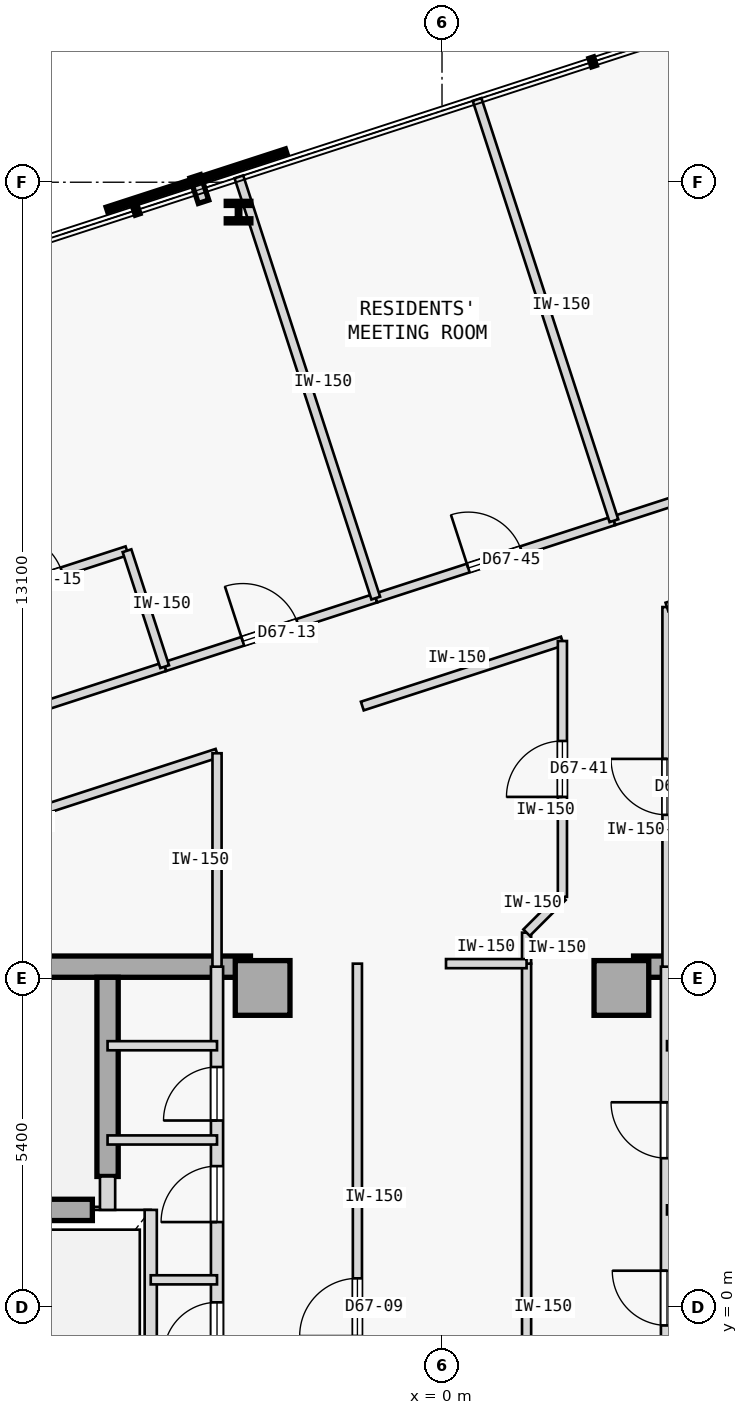
"""IFC4 building model, lengths in metres.
Left out: names, types, materials, properties, quantities, classifications, styles, units other than length and angle.
Written with IfcOpenShell. Run it as: python <this file> out.ifc"""

import sys

from ifc_helpers import new_model, si_unit, direction, frame, frame_2d, origin, origin_2d, place, context, subcontext, project, spatial, rectangle, i_section, extrude, element, fill, save


model = new_model("IFC4")
c1 = context("Model", 3, precision=1e-05, world=origin(), true_north=direction((0.0, 1.0)))
c2 = subcontext(c1, "Body", "Model", "MODEL_VIEW")
j1 = project(units=[si_unit("LENGTHUNIT", "METRE"), si_unit("PLANEANGLEUNIT", "RADIAN")], contexts=[c1])
p1 = place(None, origin())
s1 = spatial("IfcSite", under=j1, at=p1, CompositionType="ELEMENT")
p2 = place(p1, origin())
s2 = spatial("IfcBuilding", under=s1, at=p2, CompositionType="ELEMENT")
p3 = place(p2, frame((0.0, 0.0, 251.1)))
s3 = spatial("IfcBuildingStorey", under=s2, at=p3, CompositionType="ELEMENT", Elevation=251.1)
for number, where, z_axis, x_axis in (
    (1, (-2.95, 5.25, 0.0), (0.0, 0.0, 1.0), (1.0, 0.0, 0.0)),
    (2, (2.95, 5.25, 0.0), (0.0, 0.0, 1.0), (1.0, 0.0, 0.0)),
):
    element("IfcColumn", number, at=place(p3, frame(where, z_axis=z_axis, x_axis=x_axis)), inside=s3, PredefinedType="COLUMN", context=c2, shape_type="SweptSolid", body=[
        extrude(rectangle(XDim=0.9, YDim=0.9, at=origin_2d()), origin(), (0.0, 0.0, 1.0), 3.35),
    ])
p4 = place(p3, frame((-14.56, 5.6, 0.0), z_axis=(0.0, 0.0, 1.0), x_axis=(1.0, 0.0, 0.0)))
e3 = element("IfcWall", 3, at=p4, inside=s3, PredefinedType="SHEAR", context=c2, shape_type="SweptSolid", body=[
    extrude(rectangle(XDim=11.41, YDim=0.35, at=frame_2d((5.705, 0.0))), origin(), (0.0, 0.0, 1.0), 2.95),
])
p5 = place(p3, frame((-5.5, 2.15, 0.0), z_axis=(0.0, 0.0, 1.0), x_axis=(0.0, 1.0, 0.0)))
e4 = element("IfcWall", 4, at=p5, inside=s3, PredefinedType="SHEAR", context=c2, shape_type="SweptSolid", body=[
    extrude(rectangle(XDim=3.275, YDim=0.35, at=frame_2d((1.638, 0.0))), origin(), (0.0, 0.0, 1.0), 2.95),
])
p6 = place(p3, frame((-10.9, 1.6, 0.0), z_axis=(0.0, 0.0, 1.0), x_axis=(1.0, 0.0, 0.0)))
e5 = element("IfcWall", 5, at=p6, inside=s3, PredefinedType="SHEAR", context=c2, shape_type="SweptSolid", body=[
    extrude(rectangle(XDim=5.15, YDim=0.35, at=frame_2d((2.575, 0.0))), origin(), (0.0, 0.0, 1.0), 2.95),
])
p7 = place(p3, frame((3.15, 5.6, 0.0), z_axis=(0.0, 0.0, 1.0), x_axis=(1.0, 0.0, 0.0)))
e6 = element("IfcWall", 6, at=p7, inside=s3, PredefinedType="SHEAR", context=c2, shape_type="SweptSolid", body=[
    extrude(rectangle(XDim=11.41, YDim=0.35, at=frame_2d((5.705, 0.0))), origin(), (0.0, 0.0, 1.0), 2.95),
])
p8 = place(p3, frame((-3.346, 18.009, 0.0), z_axis=(0.0, 0.0, 1.0), x_axis=(1.0, 0.0, 0.0)))
e7 = element("IfcColumn", 7, at=p8, inside=s3, PredefinedType="COLUMN", context=c2, shape_type="SweptSolid", body=[
    extrude(i_section(OverallWidth=0.405, OverallDepth=0.355, WebThickness=0.042, FlangeThickness=0.068, FilletRadius=0.015, at=origin_2d()), origin(), (0.0, 0.0, 1.0), 3.35),
])
p9 = place(p3, frame((-5.5, 1.6, 0.0), z_axis=(0.0, 0.0, 1.0), x_axis=(0.0, 1.0, 0.0)))
e8 = element("IfcWall", 8, at=p9, inside=s3, PredefinedType="STANDARD", context=c2, shape_type="SweptSolid", body=[
    extrude(rectangle(XDim=0.55, YDim=0.25, at=frame_2d((0.275, 0.0))), origin(), (0.0, 0.0, 1.0), 2.95),
])
p10 = place(p3, frame((-3.7, -1.15, 0.0), z_axis=(0.0, 0.0, 1.0), x_axis=(0.0, 1.0, 0.0)))
e9 = element("IfcWall", 9, at=p10, inside=s3, PredefinedType="STANDARD", context=c2, shape_type="SweptSolid", body=[
    extrude(rectangle(XDim=6.75, YDim=0.2, at=frame_2d((3.375, 0.0))), origin(), (0.0, 0.0, 1.0), 2.95),
])
p11 = place(p10, frame((0.35, 0.0, 0.0)))
e10 = element("IfcOpeningElement", 10, at=p11, cuts=e9, PredefinedType="OPENING", context=c2, shape_type="SweptSolid", body=[
    extrude(rectangle(XDim=0.88, YDim=2.15, at=frame_2d((0.44, 1.075))), frame((0.0, 0.11, 0.0), z_axis=(0.0, -1.0, 0.0), x_axis=(1.0, 0.0, 0.0)), (0.0, 0.0, 1.0), 0.22),
])
p12 = place(p10, frame((2.55, 0.0, 0.0)))
e11 = element("IfcOpeningElement", 11, at=p12, cuts=e9, PredefinedType="OPENING", context=c2, shape_type="SweptSolid", body=[
    extrude(rectangle(XDim=0.92, YDim=2.15, at=frame_2d((0.46, 1.075))), frame((0.0, 0.11, 0.0), z_axis=(0.0, -1.0, 0.0), x_axis=(1.0, 0.0, 0.0)), (0.0, 0.0, 1.0), 0.22),
])
p13 = place(p10, frame((4.22, 0.0, 0.0)))
e12 = element("IfcOpeningElement", 12, at=p13, cuts=e9, PredefinedType="OPENING", context=c2, shape_type="SweptSolid", body=[
    extrude(rectangle(XDim=0.88, YDim=2.15, at=frame_2d((0.44, 1.075))), frame((0.0, 0.11, 0.0), z_axis=(0.0, -1.0, 0.0), x_axis=(1.0, 0.0, 0.0)), (0.0, 0.0, 1.0), 0.22),
])
p14 = place(p3, frame((-4.79, -1.15, 0.0), z_axis=(0.0, 0.0, 1.0), x_axis=(0.0, 1.0, 0.0)))
e13 = element("IfcWall", 13, at=p14, inside=s3, PredefinedType="STANDARD", context=c2, shape_type="SweptSolid", body=[
    extrude(rectangle(XDim=2.75, YDim=0.2, at=frame_2d((1.375, 0.0))), origin(), (0.0, 0.0, 1.0), 2.95),
])
p15 = place(p3, frame((3.7, -1.15, 0.0), z_axis=(0.0, 0.0, 1.0), x_axis=(0.0, 1.0, 0.0)))
e14 = element("IfcWall", 14, at=p15, inside=s3, PredefinedType="STANDARD", context=c2, shape_type="SweptSolid", body=[
    extrude(rectangle(XDim=6.75, YDim=0.2, at=frame_2d((3.375, 0.0))), origin(), (0.0, 0.0, 1.0), 2.95),
])
p16 = place(p15, frame((3.6, 0.0, 0.0)))
e15 = element("IfcOpeningElement", 15, at=p16, cuts=e14, PredefinedType="OPENING", context=c2, shape_type="SweptSolid", body=[
    extrude(rectangle(XDim=0.92, YDim=2.15, at=frame_2d((0.46, 1.075))), frame((0.0, 0.11, 0.0), z_axis=(0.0, -1.0, 0.0), x_axis=(1.0, 0.0, 0.0)), (0.0, 0.0, 1.0), 0.22),
])
p17 = place(p15, frame((0.85, 0.0, 0.0)))
e16 = element("IfcOpeningElement", 16, at=p17, cuts=e14, PredefinedType="OPENING", context=c2, shape_type="SweptSolid", body=[
    extrude(rectangle(XDim=0.9, YDim=2.15, at=frame_2d((0.45, 1.075))), frame((0.0, 0.11, 0.0), z_axis=(0.0, -1.0, 0.0), x_axis=(1.0, 0.0, 0.0)), (0.0, 0.0, 1.0), 0.22),
])
p18 = place(p3, frame((-5.5, 4.3, 0.0), z_axis=(0.0, 0.0, 1.0), x_axis=(1.0, 0.0, 0.0)))
e17 = element("IfcWall", 17, at=p18, inside=s3, PredefinedType="PARTITIONING", context=c2, shape_type="SweptSolid", body=[
    extrude(rectangle(XDim=1.8, YDim=0.15, at=frame_2d((0.9, 0.0))), origin(), (0.0, 0.0, 1.0), 2.95),
])
p19 = place(p3, frame((-4.79, 0.45, 0.0), z_axis=(0.0, 0.0, 1.0), x_axis=(1.0, 0.0, 0.0)))
e18 = element("IfcWall", 18, at=p19, inside=s3, PredefinedType="PARTITIONING", context=c2, shape_type="SweptSolid", body=[
    extrude(rectangle(XDim=1.09, YDim=0.15, at=frame_2d((0.545, 0.0))), origin(), (0.0, 0.0, 1.0), 2.95),
])
for number, where, z_axis, x_axis in (
    (19, (-5.5, 2.75, 0.0), (0.0, 0.0, 1.0), (1.0, 0.0, 0.0)),
    (20, (3.7, 4.3, 0.0), (0.0, 0.0, 1.0), (1.0, 0.0, 0.0)),
    (21, (3.7, 1.6, 0.0), (0.0, 0.0, 1.0), (1.0, 0.0, 0.0)),
):
    element("IfcWall", number, at=place(p3, frame(where, z_axis=z_axis, x_axis=x_axis)), inside=s3, PredefinedType="PARTITIONING", context=c2, shape_type="SweptSolid", body=[
        extrude(rectangle(XDim=1.8, YDim=0.15, at=frame_2d((0.9, 0.0))), origin(), (0.0, 0.0, 1.0), 2.95),
    ])
p20 = place(p3, frame((-1.391, -5.65, 0.0), z_axis=(0.0, 0.0, 1.0), x_axis=(-8.6422954e-05, 0.999999996266, 0.0)))
e22 = element("IfcWall", 22, at=p20, inside=s3, PredefinedType="PARTITIONING", context=c2, shape_type="SweptSolid", body=[
    extrude(rectangle(XDim=11.3, YDim=0.15, at=frame_2d((5.65, 0.0))), origin(), (0.0, 0.0, 1.0), 2.95),
])
p21 = place(p20, frame((5.175, 0.0, 0.0)))
e23 = element("IfcOpeningElement", 23, at=p21, cuts=e22, PredefinedType="OPENING", context=c2, shape_type="SweptSolid", body=[
    extrude(rectangle(XDim=0.95, YDim=2.15, at=frame_2d((0.475, 1.075))), frame((0.0, 0.085, 0.0), z_axis=(0.0, -1.0, 0.0), x_axis=(1.0, 0.0, 0.0)), (0.0, 0.0, 1.0), 0.17),
])
p22 = place(p3, frame((1.391, -5.648, 0.0), z_axis=(0.0, 0.0, 1.0), x_axis=(-4.3218947e-05, 0.999999999066, 0.0)))
e24 = element("IfcWall", 24, at=p22, inside=s3, PredefinedType="PARTITIONING", context=c2, shape_type="SweptSolid", body=[
    extrude(rectangle(XDim=11.298, YDim=0.15, at=frame_2d((5.649, 0.0))), origin(), (0.0, 0.0, 1.0), 2.95),
])
p23 = place(p3, frame((-4.561, 10.533, 0.0), z_axis=(0.0, 0.0, 1.0), x_axis=(0.951057168147, 0.309014988174, 0.0)))
e25 = element("IfcWall", 25, at=p23, inside=s3, PredefinedType="PARTITIONING", context=c2, shape_type="SweptSolid", body=[
    extrude(rectangle(XDim=3.65, YDim=0.15, at=frame_2d((1.825, 0.0))), origin(), (0.0, 0.0, 1.0), 2.95),
])
p24 = place(p23, frame((1.35, 0.0, 0.0)))
e26 = element("IfcOpeningElement", 26, at=p24, cuts=e25, PredefinedType="OPENING", context=c2, shape_type="SweptSolid", body=[
    extrude(rectangle(XDim=0.95, YDim=2.15, at=frame_2d((0.475, 1.075))), frame((0.0, 0.085, 0.0), z_axis=(0.0, -1.0, 0.0), x_axis=(1.0, 0.0, 0.0)), (0.0, 0.0, 1.0), 0.17),
])
p25 = place(p3, frame((-7.557, 9.56, 0.0), z_axis=(0.0, 0.0, 1.0), x_axis=(0.951058557014, 0.309010713619, 0.0)))
e27 = element("IfcWall", 27, at=p25, inside=s3, PredefinedType="PARTITIONING", context=c2, shape_type="SweptSolid", body=[
    extrude(rectangle(XDim=3.15, YDim=0.15, at=frame_2d((1.575, 0.0))), origin(), (0.0, 0.0, 1.0), 2.95),
])
p26 = place(p3, frame((3.7, 5.6, 0.0), z_axis=(0.0, 0.0, 1.0), x_axis=(-0.000123839008, 0.999999992332, 0.0)))
e28 = element("IfcWall", 28, at=p26, inside=s3, PredefinedType="PARTITIONING", context=c2, shape_type="SweptSolid", body=[
    extrude(rectangle(XDim=5.914, YDim=0.15, at=frame_2d((2.957, 0.0))), origin(), (0.0, 0.0, 1.0), 2.5),
])
p27 = place(p26, frame((2.497, 0.0, 0.0)))
e29 = element("IfcOpeningElement", 29, at=p27, cuts=e28, PredefinedType="OPENING", context=c2, shape_type="SweptSolid", body=[
    extrude(rectangle(XDim=0.92, YDim=2.15, at=frame_2d((0.46, 1.075))), frame((0.0, 0.085, 0.0), z_axis=(0.0, -1.0, 0.0), x_axis=(1.0, 0.0, 0.0)), (0.0, 0.0, 1.0), 0.17),
])
p28 = place(p3, frame((3.699, 11.514, 0.0), z_axis=(0.0, 0.0, 1.0), x_axis=(0.951069540665, 0.308976906612, 0.0)))
e30 = element("IfcWall", 30, at=p28, inside=s3, PredefinedType="PARTITIONING", context=c2, shape_type="SweptSolid", body=[
    extrude(rectangle(XDim=1.871, YDim=0.15, at=frame_2d((0.936, 0.0))), origin(), (0.0, 0.0, 1.0), 2.95),
])
p29 = place(p3, frame((-1.311, 9.886, 0.0), z_axis=(0.0, 0.0, 1.0), x_axis=(0.951068803905, 0.308979174442, 0.0)))
e31 = element("IfcWall", 31, at=p29, inside=s3, PredefinedType="PARTITIONING", context=c2, shape_type="SweptSolid", body=[
    extrude(rectangle(XDim=3.46, YDim=0.15, at=frame_2d((1.73, 0.0))), origin(), (0.0, 0.0, 1.0), 2.95),
])
p30 = place(p3, frame((1.391, 5.649, 0.0), z_axis=(0.0, 0.0, 1.0), x_axis=(0.000957395444, 0.999999541697, 0.0)))
e32 = element("IfcWall", 32, at=p30, inside=s3, PredefinedType="PARTITIONING", context=c2, shape_type="SweptSolid", body=[
    extrude(rectangle(XDim=0.51, YDim=0.15, at=frame_2d((0.255, 0.0))), origin(), (0.0, 0.0, 1.0), 2.95),
])
p31 = place(p3, frame((1.391, 6.159, 0.0), z_axis=(0.0, 0.0, 1.0), x_axis=(0.707106781187, 0.707106781187, 0.0)))
e33 = element("IfcWall", 33, at=p31, inside=s3, PredefinedType="PARTITIONING", context=c2, shape_type="SweptSolid", body=[
    extrude(rectangle(XDim=0.833, YDim=0.15, at=frame_2d((0.417, 0.0))), origin(), (0.0, 0.0, 1.0), 2.95),
])
p32 = place(p3, frame((1.98, 6.748, 0.0), z_axis=(0.0, 0.0, 1.0), x_axis=(0.0, 1.0, 0.0)))
e34 = element("IfcWall", 34, at=p32, inside=s3, PredefinedType="PARTITIONING", context=c2, shape_type="SweptSolid", body=[
    extrude(rectangle(XDim=4.207, YDim=0.15, at=frame_2d((2.104, 0.0))), origin(), (0.0, 0.0, 1.0), 2.95),
])
p33 = place(p32, frame((1.643, 0.0, 0.0)))
e35 = element("IfcOpeningElement", 35, at=p33, cuts=e34, PredefinedType="OPENING", context=c2, shape_type="SweptSolid", body=[
    extrude(rectangle(XDim=0.92, YDim=2.15, at=frame_2d((0.46, 1.075))), frame((0.0, 0.085, 0.0), z_axis=(0.0, -1.0, 0.0), x_axis=(1.0, 0.0, 0.0)), (0.0, 0.0, 1.0), 0.17),
])
p34 = place(p3, frame((-10.612, 6.864, 0.0), z_axis=(0.0, 0.0, 1.0), x_axis=(0.951060972078, 0.309003280548, 0.0)))
e36 = element("IfcWall", 36, at=p34, inside=s3, PredefinedType="PARTITIONING", context=c2, shape_type="SweptSolid", body=[
    extrude(rectangle(XDim=7.268, YDim=0.15, at=frame_2d((3.634, 0.0))), origin(), (0.0, 0.0, 1.0), 2.95),
])
p35 = place(p34, frame((3.174, 0.0, 0.0)))
e37 = element("IfcOpeningElement", 37, at=p35, cuts=e36, PredefinedType="OPENING", context=c2, shape_type="SweptSolid", body=[
    extrude(rectangle(XDim=0.92, YDim=2.15, at=frame_2d((0.46, 1.075))), frame((0.0, 0.085, 0.0), z_axis=(0.0, -1.0, 0.0), x_axis=(1.0, 0.0, 0.0)), (0.0, 0.0, 1.0), 0.17),
])
p36 = place(p3, frame((-3.7, 5.6, 0.0), z_axis=(0.0, 0.0, 1.0), x_axis=(0.000139120755, 0.999999990323, 0.0)))
e38 = element("IfcWall", 38, at=p36, inside=s3, PredefinedType="PARTITIONING", context=c2, shape_type="SweptSolid", body=[
    extrude(rectangle(XDim=3.51, YDim=0.15, at=frame_2d((1.755, 0.0))), origin(), (0.0, 0.0, 1.0), 2.95),
])
p37 = place(p3, frame((-1.089, 11.661, 0.0), z_axis=(0.0, 0.0, 1.0), x_axis=(0.951057158344, 0.309015018346, 0.0)))
e39 = element("IfcWall", 39, at=p37, inside=s3, PredefinedType="PARTITIONING", context=c2, shape_type="SweptSolid", body=[
    extrude(rectangle(XDim=4.118, YDim=0.15, at=frame_2d((2.059, 0.0))), origin(), (0.0, 0.0, 1.0), 2.95),
])
p38 = place(p37, frame((1.599, 0.0, 0.0)))
e40 = element("IfcOpeningElement", 40, at=p38, cuts=e39, PredefinedType="OPENING", context=c2, shape_type="SweptSolid", body=[
    extrude(rectangle(XDim=0.92, YDim=2.15, at=frame_2d((0.46, 1.075))), frame((0.0, 0.085, 0.0), z_axis=(0.0, -1.0, 0.0), x_axis=(1.0, 0.0, 0.0)), (0.0, 0.0, 1.0), 0.17),
])
p39 = place(p3, frame((2.827, 12.934, 0.0), z_axis=(0.0, 0.0, 1.0), x_axis=(0.951056608557, 0.309016710423, 0.0)))
e41 = element("IfcWall", 41, at=p39, inside=s3, PredefinedType="PARTITIONING", context=c2, shape_type="SweptSolid", body=[
    extrude(rectangle(XDim=7.322, YDim=0.15, at=frame_2d((3.661, 0.0))), origin(), (0.0, 0.0, 1.0), 2.95),
])
p40 = place(p39, frame((3.201, 0.0, 0.0)))
e42 = element("IfcOpeningElement", 42, at=p40, cuts=e41, PredefinedType="OPENING", context=c2, shape_type="SweptSolid", body=[
    extrude(rectangle(XDim=0.92, YDim=2.15, at=frame_2d((0.46, 1.075))), frame((0.0, 0.085, 0.0), z_axis=(0.0, -1.0, 0.0), x_axis=(1.0, 0.0, 0.0)), (0.0, 0.0, 1.0), 0.17),
])
p41 = place(p3, frame((0.066, 5.65, 0.0), z_axis=(0.0, 0.0, 1.0), x_axis=(0.999999932094, -0.000368527707, 0.0)))
e43 = element("IfcWall", 43, at=p41, inside=s3, PredefinedType="PARTITIONING", context=c2, shape_type="SweptSolid", body=[
    extrude(rectangle(XDim=1.325, YDim=0.15, at=frame_2d((0.663, 0.0))), origin(), (0.0, 0.0, 1.0), 2.95),
])
p42 = place(p3, frame((-8.176, 11.467, 0.0), z_axis=(0.0, 0.0, 1.0), x_axis=(0.951058557014, 0.309010713619, 0.0)))
e44 = element("IfcWall", 44, at=p42, inside=s3, PredefinedType="PARTITIONING", context=c2, shape_type="SweptSolid", body=[
    extrude(rectangle(XDim=3.15, YDim=0.15, at=frame_2d((1.575, 0.0))), origin(), (0.0, 0.0, 1.0), 2.95),
])
p43 = place(p42, frame((1.125, 0.0, 0.0)))
e45 = element("IfcOpeningElement", 45, at=p43, cuts=e44, PredefinedType="OPENING", context=c2, shape_type="SweptSolid", body=[
    extrude(rectangle(XDim=0.9, YDim=2.15, at=frame_2d((0.45, 1.075))), frame((0.0, 0.085, 0.0), z_axis=(0.0, -1.0, 0.0), x_axis=(1.0, 0.0, 0.0)), (0.0, 0.0, 1.0), 0.17),
])
p44 = place(p3, frame((-4.561, 10.533, 0.0), z_axis=(0.0, 0.0, 1.0), x_axis=(-0.309022749039, 0.951054646472, 0.0)))
e46 = element("IfcWall", 46, at=p44, inside=s3, PredefinedType="PARTITIONING", context=c2, shape_type="SweptSolid", body=[
    extrude(rectangle(XDim=2.005, YDim=0.15, at=frame_2d((1.002, 0.0))), origin(), (0.0, 0.0, 1.0), 2.95),
])
for number, where, z_axis, x_axis in (
    (47, (-1.089, 11.661, 0.0), (0.0, 0.0, 1.0), (-0.309, 0.951, 0.0)),
    (48, (2.827, 12.934, 0.0), (0.0, 0.0, 1.0), (-0.309, 0.951, 0.0)),
):
    element("IfcWall", number, at=place(p3, frame(where, z_axis=z_axis, x_axis=x_axis)), inside=s3, PredefinedType="PARTITIONING", context=c2, shape_type="SweptSolid", body=[
        extrude(rectangle(XDim=7.284, YDim=0.15, at=frame_2d((3.642, 0.0))), origin(), (0.0, 0.0, 1.0), 2.95),
    ])
p45 = place(p11, origin())
e49 = element("IfcDoor", 49, at=p45, inside=s3, OperationType="SINGLE_SWING_LEFT", PredefinedType="DOOR", context=c2, shape_type="SweptSolid", body=[
    extrude(rectangle(XDim=0.88, YDim=2.15, at=frame_2d((0.44, 1.075))), frame((0.0, 0.025, 0.0), z_axis=(0.0, -1.0, 0.0), x_axis=(1.0, 0.0, 0.0)), (0.0, 0.0, 1.0), 0.05),
])
fill(e10, e49)
p46 = place(p12, origin())
e50 = element("IfcDoor", 50, at=p46, inside=s3, OperationType="SINGLE_SWING_LEFT", PredefinedType="DOOR", context=c2, shape_type="SweptSolid", body=[
    extrude(rectangle(XDim=0.92, YDim=2.15, at=frame_2d((0.46, 1.075))), frame((0.0, 0.025, 0.0), z_axis=(0.0, -1.0, 0.0), x_axis=(1.0, 0.0, 0.0)), (0.0, 0.0, 1.0), 0.05),
])
fill(e11, e50)
p47 = place(p13, origin())
e51 = element("IfcDoor", 51, at=p47, inside=s3, OperationType="SINGLE_SWING_LEFT", PredefinedType="DOOR", context=c2, shape_type="SweptSolid", body=[
    extrude(rectangle(XDim=0.88, YDim=2.15, at=frame_2d((0.44, 1.075))), frame((0.0, 0.025, 0.0), z_axis=(0.0, -1.0, 0.0), x_axis=(1.0, 0.0, 0.0)), (0.0, 0.0, 1.0), 0.05),
])
fill(e12, e51)
p48 = place(p16, origin())
e52 = element("IfcDoor", 52, at=p48, inside=s3, OperationType="SINGLE_SWING_RIGHT", PredefinedType="DOOR", context=c2, shape_type="SweptSolid", body=[
    extrude(rectangle(XDim=0.92, YDim=2.15, at=frame_2d((0.46, 1.075))), frame((0.0, 0.025, 0.0), z_axis=(0.0, -1.0, 0.0), x_axis=(1.0, 0.0, 0.0)), (0.0, 0.0, 1.0), 0.05),
])
fill(e15, e52)
p49 = place(p17, origin())
e53 = element("IfcDoor", 53, at=p49, inside=s3, OperationType="SINGLE_SWING_RIGHT", PredefinedType="DOOR", context=c2, shape_type="SweptSolid", body=[
    extrude(rectangle(XDim=0.9, YDim=2.15, at=frame_2d((0.45, 1.075))), frame((0.0, 0.025, 0.0), z_axis=(0.0, -1.0, 0.0), x_axis=(1.0, 0.0, 0.0)), (0.0, 0.0, 1.0), 0.05),
])
fill(e16, e53)
p50 = place(p21, origin())
e54 = element("IfcDoor", 54, at=p50, inside=s3, OperationType="SINGLE_SWING_LEFT", PredefinedType="DOOR", context=c2, shape_type="SweptSolid", body=[
    extrude(rectangle(XDim=0.95, YDim=2.15, at=frame_2d((0.475, 1.075))), frame((0.0, 0.025, 0.0), z_axis=(0.0, -1.0, 0.0), x_axis=(1.0, 0.0, 0.0)), (0.0, 0.0, 1.0), 0.05),
])
fill(e23, e54)
p51 = place(p24, origin())
e55 = element("IfcDoor", 55, at=p51, inside=s3, OperationType="SINGLE_SWING_LEFT", PredefinedType="DOOR", context=c2, shape_type="SweptSolid", body=[
    extrude(rectangle(XDim=0.95, YDim=2.15, at=frame_2d((0.475, 1.075))), frame((0.0, 0.025, 0.0), z_axis=(0.0, -1.0, 0.0), x_axis=(1.0, 0.0, 0.0)), (0.0, 0.0, 1.0), 0.05),
])
fill(e26, e55)
p52 = place(p43, origin())
e56 = element("IfcDoor", 56, at=p52, inside=s3, OperationType="SINGLE_SWING_LEFT", PredefinedType="DOOR", context=c2, shape_type="SweptSolid", body=[
    extrude(rectangle(XDim=0.9, YDim=2.15, at=frame_2d((0.45, 1.075))), frame((0.0, 0.025, 0.0), z_axis=(0.0, -1.0, 0.0), x_axis=(1.0, 0.0, 0.0)), (0.0, 0.0, 1.0), 0.05),
])
fill(e45, e56)
p53 = place(p27, origin())
e57 = element("IfcDoor", 57, at=p53, inside=s3, OperationType="SINGLE_SWING_RIGHT", PredefinedType="DOOR", context=c2, shape_type="SweptSolid", body=[
    extrude(rectangle(XDim=0.92, YDim=2.15, at=frame_2d((0.46, 1.075))), frame((0.0, 0.025, 0.0), z_axis=(0.0, -1.0, 0.0), x_axis=(1.0, 0.0, 0.0)), (0.0, 0.0, 1.0), 0.05),
])
fill(e29, e57)
p54 = place(p33, origin())
e58 = element("IfcDoor", 58, at=p54, inside=s3, OperationType="SINGLE_SWING_LEFT", PredefinedType="DOOR", context=c2, shape_type="SweptSolid", body=[
    extrude(rectangle(XDim=0.92, YDim=2.15, at=frame_2d((0.46, 1.075))), frame((0.0, 0.025, 0.0), z_axis=(0.0, -1.0, 0.0), x_axis=(1.0, 0.0, 0.0)), (0.0, 0.0, 1.0), 0.05),
])
fill(e35, e58)
p55 = place(p38, origin())
e59 = element("IfcDoor", 59, at=p55, inside=s3, OperationType="SINGLE_SWING_LEFT", PredefinedType="DOOR", context=c2, shape_type="SweptSolid", body=[
    extrude(rectangle(XDim=0.92, YDim=2.15, at=frame_2d((0.46, 1.075))), frame((0.0, 0.025, 0.0), z_axis=(0.0, -1.0, 0.0), x_axis=(1.0, 0.0, 0.0)), (0.0, 0.0, 1.0), 0.05),
])
fill(e40, e59)
save(model, sys.argv[1])
